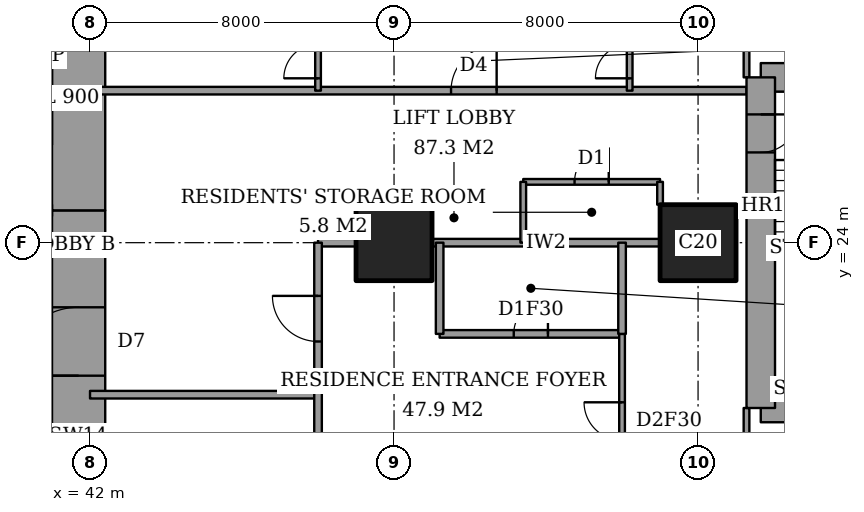
"""IFC4 building model, lengths in metres.
Left out: names, types, materials, properties, quantities, classifications, styles, units other than length and angle.
Written with IfcOpenShell. Run it as: python <this file> out.ifc"""

import sys

from ifc_helpers import new_model, si_unit, direction, frame, frame_2d, origin, origin_2d, place, context, subcontext, project, spatial, rectangle, extrude, element, fill, save


model = new_model("IFC4")
c1 = context("Model", 3, precision=1e-05, world=origin(), true_north=direction((0.0, 1.0)))
c2 = subcontext(c1, "Body", "Model", "MODEL_VIEW")
j1 = project(units=[si_unit("LENGTHUNIT", "METRE"), si_unit("PLANEANGLEUNIT", "RADIAN")], contexts=[c1])
p1 = place(None, origin())
s1 = spatial("IfcSite", under=j1, at=p1, CompositionType="ELEMENT")
p2 = place(p1, origin())
s2 = spatial("IfcBuilding", under=s1, at=p2, CompositionType="ELEMENT")
p3 = place(p2, frame((0.0, 0.0, 72.8)))
s3 = spatial("IfcBuildingStorey", under=s2, at=p3, CompositionType="ELEMENT", Elevation=72.8)
for number, where, z_axis, x_axis in (
    (1, (50.0, 24.0, 0.0), (0.0, 0.0, 1.0), (1.0, 0.0, 0.0)),
    (2, (58.0, 24.0, 0.0), (0.0, 0.0, 1.0), (1.0, 0.0, 0.0)),
):
    element("IfcColumn", number, at=place(p3, frame(where, z_axis=z_axis, x_axis=x_axis)), inside=s3, PredefinedType="COLUMN", context=c2, shape_type="SweptSolid", body=[
        extrude(rectangle(XDim=2.0, YDim=2.0, at=origin_2d()), origin(), (0.0, 0.0, 1.0), 3.6),
    ])
p4 = place(p3, frame((41.7, 13.0, 0.0), z_axis=(0.0, 0.0, 1.0), x_axis=(0.0, 1.0, 0.0)))
e3 = element("IfcWall", 3, at=p4, inside=s3, PredefinedType="SHEAR", context=c2, shape_type="SweptSolid", body=[
    extrude(rectangle(XDim=11.85, YDim=1.4, at=frame_2d((5.925, 0.0))), origin(), (0.0, 0.0, 1.0), 3.6),
])
p5 = place(p4, frame((7.5, 0.0, 0.0)))
e4 = element("IfcOpeningElement", 4, at=p5, cuts=e3, PredefinedType="OPENING", context=c2, shape_type="SweptSolid", body=[
    extrude(rectangle(XDim=1.8, YDim=2.4, at=frame_2d((0.9, 1.2))), frame((0.0, 0.71, 0.0), z_axis=(0.0, -1.0, 0.0), x_axis=(1.0, 0.0, 0.0)), (0.0, 0.0, 1.0), 1.42),
])
p6 = place(p3, frame((41.7, 24.85, 0.0), z_axis=(0.0, 0.0, 1.0), x_axis=(0.0, 1.0, 0.0)))
e5 = element("IfcWall", 5, at=p6, inside=s3, PredefinedType="SHEAR", context=c2, shape_type="SweptSolid", body=[
    extrude(rectangle(XDim=10.15, YDim=1.4, at=frame_2d((5.075, 0.0))), origin(), (0.0, 0.0, 1.0), 3.6),
])
for number, where, z_axis, x_axis in (
    (6, (59.65, 19.65, 0.0), (0.0, 0.0, 1.0), (1.0, 0.0, 0.0)),
    (7, (64.1, 28.35, 0.0), (0.0, 0.0, 1.0), (-1.0, 0.0, 0.0)),
):
    element("IfcWall", number, at=place(p3, frame(where, z_axis=z_axis, x_axis=x_axis)), inside=s3, PredefinedType="SHEAR", context=c2, shape_type="SweptSolid", body=[
        extrude(rectangle(XDim=4.45, YDim=0.75, at=frame_2d((2.225, 0.0))), origin(), (0.0, 0.0, 1.0), 3.6),
    ])
p7 = place(p3, frame((59.65, 28.35, 0.0), z_axis=(0.0, 0.0, 1.0), x_axis=(0.0, -1.0, 0.0)))
e8 = element("IfcWall", 8, at=p7, inside=s3, PredefinedType="SHEAR", context=c2, shape_type="SweptSolid", body=[
    extrude(rectangle(XDim=8.7, YDim=0.75, at=frame_2d((4.35, 0.0))), origin(), (0.0, 0.0, 1.0), 3.6),
])
p8 = place(p7, frame((0.975, 0.0, 0.0)))
e9 = element("IfcOpeningElement", 9, at=p8, cuts=e8, PredefinedType="OPENING", context=c2, shape_type="SweptSolid", body=[
    extrude(rectangle(XDim=1.0, YDim=2.1, at=frame_2d((0.5, 1.05))), frame((0.0, 0.385, 0.0), z_axis=(0.0, -1.0, 0.0), x_axis=(1.0, 0.0, 0.0)), (0.0, 0.0, 1.0), 0.77),
])
p9 = place(p3, frame((42.0, 20.0, 0.0), z_axis=(0.0, 0.0, 1.0), x_axis=(1.0, 0.0, 0.0)))
e10 = element("IfcWall", 10, at=p9, inside=s3, PredefinedType="PARTITIONING", context=c2, shape_type="SweptSolid", body=[
    extrude(rectangle(XDim=6.0, YDim=0.2, at=frame_2d((3.0, 0.0))), origin(), (0.0, 0.0, 1.0), 3.35),
])
p10 = place(p3, frame((51.2, 21.6, 0.0), z_axis=(0.0, 0.0, 1.0), x_axis=(1.0, 0.0, 0.0)))
e11 = element("IfcWall", 11, at=p10, inside=s3, PredefinedType="PARTITIONING", context=c2, shape_type="SweptSolid", body=[
    extrude(rectangle(XDim=4.8, YDim=0.2, at=frame_2d((2.4, 0.0))), origin(), (0.0, 0.0, 1.0), 3.35),
])
p11 = place(p10, frame((1.95, 0.0, 0.0)))
e12 = element("IfcOpeningElement", 12, at=p11, cuts=e11, PredefinedType="OPENING", context=c2, shape_type="SweptSolid", body=[
    extrude(rectangle(XDim=0.9, YDim=2.1, at=frame_2d((0.45, 1.05))), frame((0.0, 0.11, 0.0), z_axis=(0.0, -1.0, 0.0), x_axis=(1.0, 0.0, 0.0)), (0.0, 0.0, 1.0), 0.22),
])
p12 = place(p3, frame((48.0, 24.0, 0.0), z_axis=(0.0, 0.0, 1.0), x_axis=(1.0, 0.0, 0.0)))
e13 = element("IfcWall", 13, at=p12, inside=s3, PredefinedType="PARTITIONING", context=c2, shape_type="SweptSolid", body=[
    extrude(rectangle(XDim=1.0, YDim=0.2, at=frame_2d((0.5, 0.0))), origin(), (0.0, 0.0, 1.0), 3.35),
])
p13 = place(p3, frame((51.0, 24.0, 0.0), z_axis=(0.0, 0.0, 1.0), x_axis=(1.0, 0.0, 0.0)))
e14 = element("IfcWall", 14, at=p13, inside=s3, PredefinedType="PARTITIONING", context=c2, shape_type="SweptSolid", body=[
    extrude(rectangle(XDim=6.0, YDim=0.2, at=frame_2d((3.0, 0.0))), origin(), (0.0, 0.0, 1.0), 3.35),
])
p14 = place(p3, frame((53.4, 25.6, 0.0), z_axis=(0.0, 0.0, 1.0), x_axis=(1.0, 0.0, 0.0)))
e15 = element("IfcWall", 15, at=p14, inside=s3, PredefinedType="PARTITIONING", context=c2, shape_type="SweptSolid", body=[
    extrude(rectangle(XDim=3.6, YDim=0.15, at=frame_2d((1.8, 0.0))), origin(), (0.0, 0.0, 1.0), 3.35),
])
p15 = place(p14, frame((1.35, 0.0, 0.0)))
e16 = element("IfcOpeningElement", 16, at=p15, cuts=e15, PredefinedType="OPENING", context=c2, shape_type="SweptSolid", body=[
    extrude(rectangle(XDim=0.9, YDim=2.1, at=frame_2d((0.45, 1.05))), frame((0.0, 0.085, 0.0), z_axis=(0.0, -1.0, 0.0), x_axis=(1.0, 0.0, 0.0)), (0.0, 0.0, 1.0), 0.17),
])
p16 = place(p3, frame((42.0, 28.0, 0.0), z_axis=(0.0, 0.0, 1.0), x_axis=(1.0, 0.0, 0.0)))
e17 = element("IfcWall", 17, at=p16, inside=s3, PredefinedType="PARTITIONING", context=c2, shape_type="SweptSolid", body=[
    extrude(rectangle(XDim=17.275, YDim=0.2, at=frame_2d((8.637, 0.0))), origin(), (0.0, 0.0, 1.0), 3.35),
])
p17 = place(p16, frame((9.5, 0.0, 0.0)))
e18 = element("IfcOpeningElement", 18, at=p17, cuts=e17, PredefinedType="OPENING", context=c2, shape_type="SweptSolid", body=[
    extrude(rectangle(XDim=1.2, YDim=2.4, at=frame_2d((0.6, 1.2))), frame((0.0, 0.11, 0.0), z_axis=(0.0, -1.0, 0.0), x_axis=(1.0, 0.0, 0.0)), (0.0, 0.0, 1.0), 0.22),
])
p18 = place(p3, frame((48.0, 17.0, 0.0), z_axis=(0.0, 0.0, 1.0), x_axis=(0.0, 1.0, 0.0)))
e19 = element("IfcWall", 19, at=p18, inside=s3, PredefinedType="PARTITIONING", context=c2, shape_type="SweptSolid", body=[
    extrude(rectangle(XDim=7.0, YDim=0.2, at=frame_2d((3.5, 0.0))), origin(), (0.0, 0.0, 1.0), 3.35),
])
p19 = place(p18, frame((4.4, 0.0, 0.0)))
e20 = element("IfcOpeningElement", 20, at=p19, cuts=e19, PredefinedType="OPENING", context=c2, shape_type="SweptSolid", body=[
    extrude(rectangle(XDim=1.2, YDim=2.4, at=frame_2d((0.6, 1.2))), frame((0.0, 0.11, 0.0), z_axis=(0.0, -1.0, 0.0), x_axis=(1.0, 0.0, 0.0)), (0.0, 0.0, 1.0), 0.22),
])
p20 = place(p18, frame((1.05, 0.0, 0.0)))
e21 = element("IfcOpeningElement", 21, at=p20, cuts=e19, PredefinedType="OPENING", context=c2, shape_type="SweptSolid", body=[
    extrude(rectangle(XDim=0.9, YDim=2.1, at=frame_2d((0.45, 1.05))), frame((0.0, 0.11, 0.0), z_axis=(0.0, -1.0, 0.0), x_axis=(1.0, 0.0, 0.0)), (0.0, 0.0, 1.0), 0.22),
])
p21 = place(p3, frame((48.0, 28.0, 0.0), z_axis=(0.0, 0.0, 1.0), x_axis=(0.0, 1.0, 0.0)))
e22 = element("IfcWall", 22, at=p21, inside=s3, PredefinedType="PARTITIONING", context=c2, shape_type="SweptSolid", body=[
    extrude(rectangle(XDim=9.4, YDim=0.15, at=frame_2d((4.7, 0.0))), origin(), (0.0, 0.0, 1.0), 3.35),
])
p22 = place(p21, frame((0.325, 0.0, 0.0)))
e23 = element("IfcOpeningElement", 23, at=p22, cuts=e22, PredefinedType="OPENING", context=c2, shape_type="SweptSolid", body=[
    extrude(rectangle(XDim=0.9, YDim=2.1, at=frame_2d((0.45, 1.05))), frame((0.0, 0.085, 0.0), z_axis=(0.0, -1.0, 0.0), x_axis=(1.0, 0.0, 0.0)), (0.0, 0.0, 1.0), 0.17),
])
p23 = place(p3, frame((51.2, 21.6, 0.0), z_axis=(0.0, 0.0, 1.0), x_axis=(0.0, 1.0, 0.0)))
e24 = element("IfcWall", 24, at=p23, inside=s3, PredefinedType="PARTITIONING", context=c2, shape_type="SweptSolid", body=[
    extrude(rectangle(XDim=2.4, YDim=0.2, at=frame_2d((1.2, 0.0))), origin(), (0.0, 0.0, 1.0), 3.35),
])
p24 = place(p3, frame((53.4, 24.0, 0.0), z_axis=(0.0, 0.0, 1.0), x_axis=(0.0, 1.0, 0.0)))
e25 = element("IfcWall", 25, at=p24, inside=s3, PredefinedType="PARTITIONING", context=c2, shape_type="SweptSolid", body=[
    extrude(rectangle(XDim=1.6, YDim=0.15, at=frame_2d((0.8, 0.0))), origin(), (0.0, 0.0, 1.0), 3.35),
])
p25 = place(p3, frame((56.0, 21.6, 0.0), z_axis=(0.0, 0.0, 1.0), x_axis=(0.0, 1.0, 0.0)))
e26 = element("IfcWall", 26, at=p25, inside=s3, PredefinedType="PARTITIONING", context=c2, shape_type="SweptSolid", body=[
    extrude(rectangle(XDim=2.4, YDim=0.2, at=frame_2d((1.2, 0.0))), origin(), (0.0, 0.0, 1.0), 3.35),
])
p26 = place(p3, frame((56.0, 10.6, 0.0), z_axis=(0.0, 0.0, 1.0), x_axis=(0.0, 1.0, 0.0)))
e27 = element("IfcWall", 27, at=p26, inside=s3, PredefinedType="PARTITIONING", context=c2, shape_type="SweptSolid", body=[
    extrude(rectangle(XDim=11.0, YDim=0.15, at=frame_2d((5.5, 0.0))), origin(), (0.0, 0.0, 1.0), 3.35),
])
p27 = place(p26, frame((8.2, 0.0, 0.0)))
e28 = element("IfcOpeningElement", 28, at=p27, cuts=e27, PredefinedType="OPENING", context=c2, shape_type="SweptSolid", body=[
    extrude(rectangle(XDim=1.0, YDim=2.1, at=frame_2d((0.5, 1.05))), frame((0.0, 0.085, 0.0), z_axis=(0.0, -1.0, 0.0), x_axis=(1.0, 0.0, 0.0)), (0.0, 0.0, 1.0), 0.17),
])
p28 = place(p3, frame((56.2, 28.0, 0.0), z_axis=(0.0, 0.0, 1.0), x_axis=(0.0, 1.0, 0.0)))
e29 = element("IfcWall", 29, at=p28, inside=s3, PredefinedType="PARTITIONING", context=c2, shape_type="SweptSolid", body=[
    extrude(rectangle(XDim=9.4, YDim=0.15, at=frame_2d((4.7, 0.0))), origin(), (0.0, 0.0, 1.0), 3.35),
])
p29 = place(p28, frame((0.325, 0.0, 0.0)))
e30 = element("IfcOpeningElement", 30, at=p29, cuts=e29, PredefinedType="OPENING", context=c2, shape_type="SweptSolid", body=[
    extrude(rectangle(XDim=0.9, YDim=2.1, at=frame_2d((0.45, 1.05))), frame((0.0, 0.085, 0.0), z_axis=(0.0, -1.0, 0.0), x_axis=(1.0, 0.0, 0.0)), (0.0, 0.0, 1.0), 0.17),
])
p30 = place(p3, frame((57.0, 25.0, 0.0), z_axis=(0.0, 0.0, 1.0), x_axis=(0.0, 1.0, 0.0)))
e31 = element("IfcWall", 31, at=p30, inside=s3, PredefinedType="PARTITIONING", context=c2, shape_type="SweptSolid", body=[
    extrude(rectangle(XDim=0.6, YDim=0.15, at=frame_2d((0.3, 0.0))), origin(), (0.0, 0.0, 1.0), 3.35),
])
p31 = place(p3, frame((59.275, 17.2, 0.0), z_axis=(0.0, 0.0, 1.0), x_axis=(0.0, 1.0, 0.0)))
e32 = element("IfcWall", 32, at=p31, inside=s3, PredefinedType="PARTITIONING", context=c2, shape_type="SweptSolid", body=[
    extrude(rectangle(XDim=2.45, YDim=0.15, at=frame_2d((1.225, 0.0))), origin(), (0.0, 0.0, 1.0), 3.35),
])
p32 = place(p31, frame((0.538, 0.0, 0.0)))
e33 = element("IfcOpeningElement", 33, at=p32, cuts=e32, PredefinedType="OPENING", context=c2, shape_type="SweptSolid", body=[
    extrude(rectangle(XDim=1.0, YDim=2.1, at=frame_2d((0.5, 1.05))), frame((0.0, 0.085, 0.0), z_axis=(0.0, -1.0, 0.0), x_axis=(1.0, 0.0, 0.0)), (0.0, 0.0, 1.0), 0.17),
])
p33 = place(p3, frame((59.275, 28.35, 0.0), z_axis=(0.0, 0.0, 1.0), x_axis=(0.0, 1.0, 0.0)))
e34 = element("IfcWall", 34, at=p33, inside=s3, PredefinedType="PARTITIONING", context=c2, shape_type="SweptSolid", body=[
    extrude(rectangle(XDim=2.45, YDim=0.15, at=frame_2d((1.225, 0.0))), origin(), (0.0, 0.0, 1.0), 3.35),
])
p34 = place(p33, frame((0.913, 0.0, 0.0)))
e35 = element("IfcOpeningElement", 35, at=p34, cuts=e34, PredefinedType="OPENING", context=c2, shape_type="SweptSolid", body=[
    extrude(rectangle(XDim=1.0, YDim=2.1, at=frame_2d((0.5, 1.05))), frame((0.0, 0.085, 0.0), z_axis=(0.0, -1.0, 0.0), x_axis=(1.0, 0.0, 0.0)), (0.0, 0.0, 1.0), 0.17),
])
p35 = place(p27, origin())
e36 = element("IfcDoor", 36, at=p35, inside=s3, OperationType="SINGLE_SWING_LEFT", PredefinedType="DOOR", context=c2, shape_type="SweptSolid", body=[
    extrude(rectangle(XDim=1.0, YDim=2.1, at=frame_2d((0.5, 1.05))), frame((0.0, 0.025, 0.0), z_axis=(0.0, -1.0, 0.0), x_axis=(1.0, 0.0, 0.0)), (0.0, 0.0, 1.0), 0.05),
])
fill(e28, e36)
p36 = place(p11, origin())
e37 = element("IfcDoor", 37, at=p36, inside=s3, OperationType="SINGLE_SWING_LEFT", PredefinedType="DOOR", context=c2, shape_type="SweptSolid", body=[
    extrude(rectangle(XDim=0.9, YDim=2.1, at=frame_2d((0.45, 1.05))), frame((0.0, 0.025, 0.0), z_axis=(0.0, -1.0, 0.0), x_axis=(1.0, 0.0, 0.0)), (0.0, 0.0, 1.0), 0.05),
])
fill(e12, e37)
p37 = place(p19, origin())
e38 = element("IfcDoor", 38, at=p37, inside=s3, OperationType="SINGLE_SWING_LEFT", PredefinedType="DOOR", context=c2, shape_type="SweptSolid", body=[
    extrude(rectangle(XDim=1.2, YDim=2.4, at=frame_2d((0.6, 1.2))), frame((0.0, 0.025, 0.0), z_axis=(0.0, -1.0, 0.0), x_axis=(1.0, 0.0, 0.0)), (0.0, 0.0, 1.0), 0.05),
])
fill(e20, e38)
p38 = place(p29, origin())
e39 = element("IfcDoor", 39, at=p38, inside=s3, OperationType="SINGLE_SWING_RIGHT", PredefinedType="DOOR", context=c2, shape_type="SweptSolid", body=[
    extrude(rectangle(XDim=0.9, YDim=2.1, at=frame_2d((0.45, 1.05))), frame((0.0, 0.025, 0.0), z_axis=(0.0, -1.0, 0.0), x_axis=(1.0, 0.0, 0.0)), (0.0, 0.0, 1.0), 0.05),
])
fill(e30, e39)
p39 = place(p17, origin())
e40 = element("IfcDoor", 40, at=p39, inside=s3, OperationType="SINGLE_SWING_LEFT", PredefinedType="DOOR", context=c2, shape_type="SweptSolid", body=[
    extrude(rectangle(XDim=1.2, YDim=2.4, at=frame_2d((0.6, 1.2))), frame((0.0, 0.025, 0.0), z_axis=(0.0, -1.0, 0.0), x_axis=(1.0, 0.0, 0.0)), (0.0, 0.0, 1.0), 0.05),
])
fill(e18, e40)
p40 = place(p22, origin())
e41 = element("IfcDoor", 41, at=p40, inside=s3, OperationType="SINGLE_SWING_RIGHT", PredefinedType="DOOR", context=c2, shape_type="SweptSolid", body=[
    extrude(rectangle(XDim=0.9, YDim=2.1, at=frame_2d((0.45, 1.05))), frame((0.0, 0.025, 0.0), z_axis=(0.0, -1.0, 0.0), x_axis=(1.0, 0.0, 0.0)), (0.0, 0.0, 1.0), 0.05),
])
fill(e23, e41)
p41 = place(p15, origin())
e42 = element("IfcDoor", 42, at=p41, inside=s3, OperationType="SINGLE_SWING_LEFT", PredefinedType="DOOR", context=c2, shape_type="SweptSolid", body=[
    extrude(rectangle(XDim=0.9, YDim=2.1, at=frame_2d((0.45, 1.05))), frame((0.0, 0.025, 0.0), z_axis=(0.0, -1.0, 0.0), x_axis=(1.0, 0.0, 0.0)), (0.0, 0.0, 1.0), 0.05),
])
fill(e16, e42)
p42 = place(p5, origin())
e43 = element("IfcDoor", 43, at=p42, inside=s3, OperationType="DOUBLE_DOOR_DOUBLE_SWING", PredefinedType="DOOR", context=c2, shape_type="SweptSolid", body=[
    extrude(rectangle(XDim=1.8, YDim=2.4, at=frame_2d((0.9, 1.2))), frame((0.0, 0.025, 0.0), z_axis=(0.0, -1.0, 0.0), x_axis=(1.0, 0.0, 0.0)), (0.0, 0.0, 1.0), 0.05),
])
fill(e4, e43)
p43 = place(p8, origin())
e44 = element("IfcDoor", 44, at=p43, inside=s3, OperationType="SINGLE_SWING_RIGHT", PredefinedType="DOOR", context=c2, shape_type="SweptSolid", body=[
    extrude(rectangle(XDim=1.0, YDim=2.1, at=frame_2d((0.5, 1.05))), frame((0.0, 0.025, 0.0), z_axis=(0.0, -1.0, 0.0), x_axis=(1.0, 0.0, 0.0)), (0.0, 0.0, 1.0), 0.05),
])
fill(e9, e44)
save(model, sys.argv[1])
